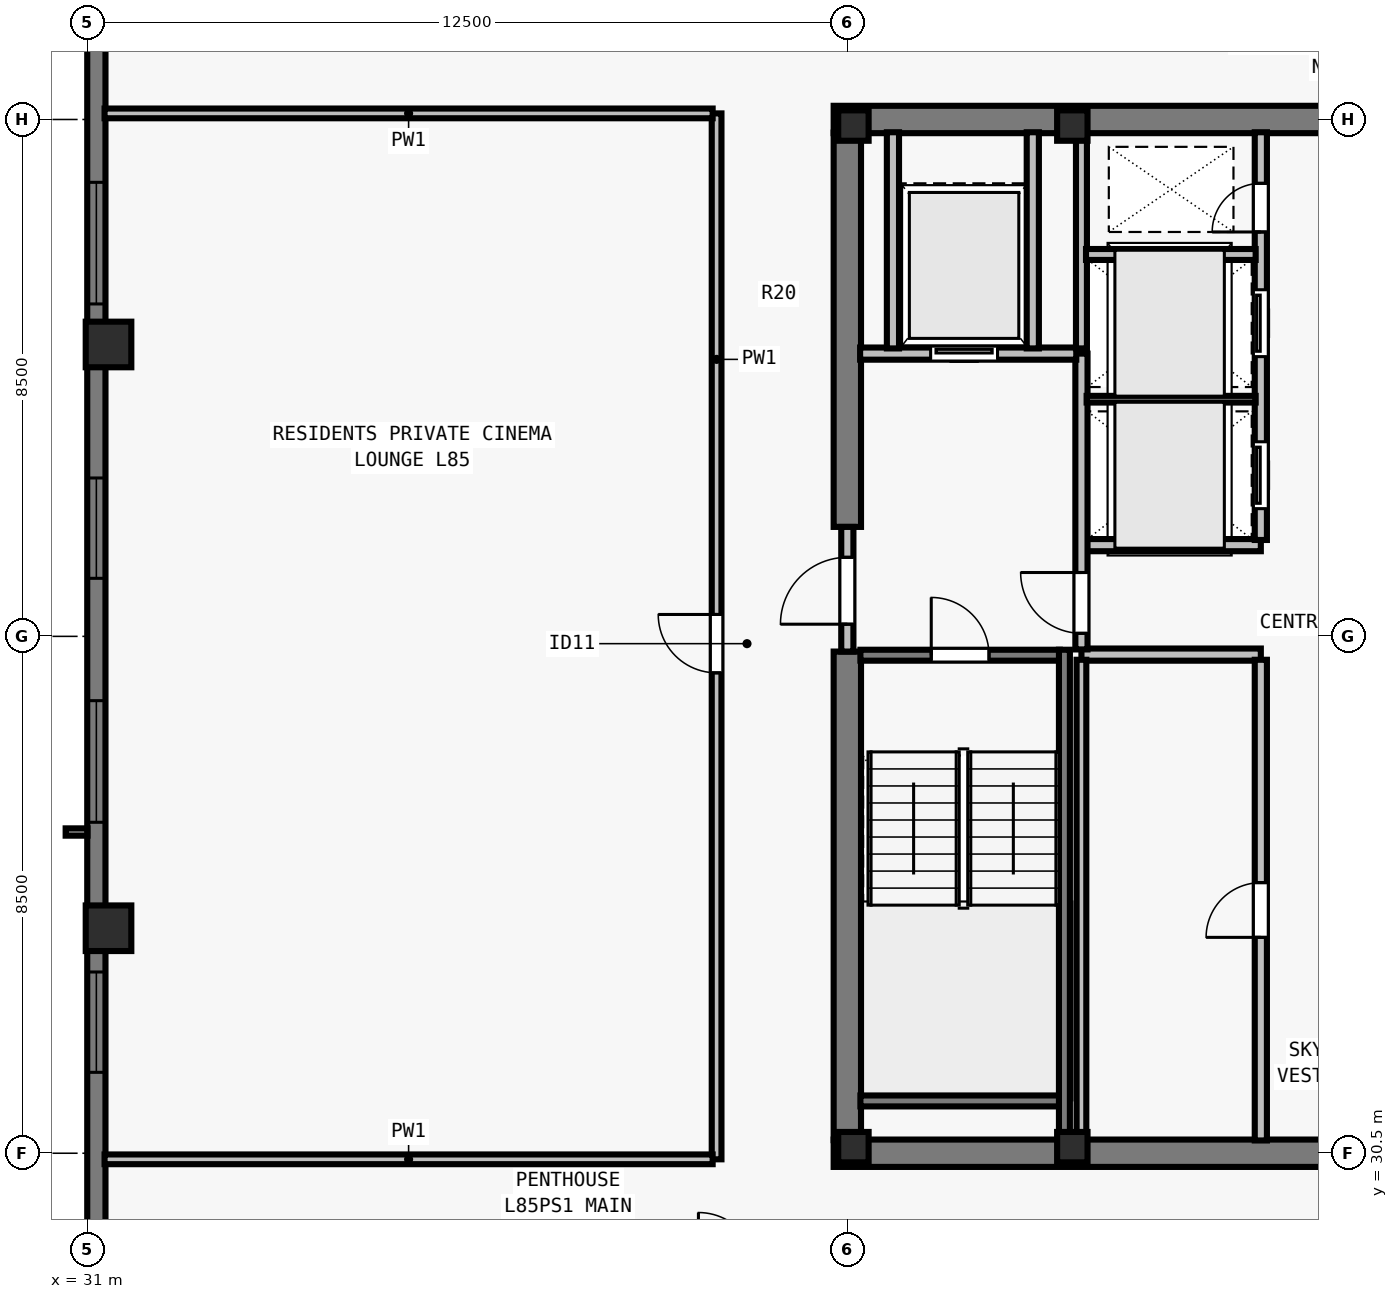
"""IFC4 building model, lengths in metres.
Left out: names, types, materials, properties, quantities, classifications, styles, units other than length and angle.
Written with IfcOpenShell. Run it as: python <this file> out.ifc"""

import sys

from ifc_helpers import new_model, si_unit, direction, frame, frame_2d, origin, origin_2d, place, context, subcontext, project, spatial, rectangle, i_section, extrude, element, fill, save


model = new_model("IFC4")
c1 = context("Model", 3, precision=1e-05, world=origin(), true_north=direction((0.0, 1.0)))
c2 = subcontext(c1, "Body", "Model", "MODEL_VIEW")
j1 = project(units=[si_unit("LENGTHUNIT", "METRE"), si_unit("PLANEANGLEUNIT", "RADIAN")], contexts=[c1])
p1 = place(None, origin())
s1 = spatial("IfcSite", under=j1, at=p1, CompositionType="ELEMENT")
p2 = place(p1, origin())
s2 = spatial("IfcBuilding", under=s1, at=p2, CompositionType="ELEMENT")
p3 = place(p2, frame((0.0, 0.0, 308.5)))
s3 = spatial("IfcBuildingStorey", under=s2, at=p3, CompositionType="ELEMENT", Elevation=308.5)
for number, where, z_axis, x_axis in (
    (1, (43.6, 30.6, 0.0), (0.0, 0.0, 1.0), (1.0, 0.0, 0.0)),
    (2, (47.2, 30.6, 0.0), (0.0, 0.0, 1.0), (1.0, 0.0, 0.0)),
    (3, (43.6, 47.4, 0.0), (0.0, 0.0, 1.0), (1.0, 0.0, 0.0)),
    (4, (47.2, 47.4, 0.0), (0.0, 0.0, 1.0), (1.0, 0.0, 0.0)),
):
    element("IfcColumn", number, at=place(p3, frame(where, z_axis=z_axis, x_axis=x_axis)), inside=s3, PredefinedType="COLUMN", context=c2, shape_type="SweptSolid", body=[
        extrude(i_section(OverallWidth=0.5, OverallDepth=0.5, WebThickness=0.028, FlangeThickness=0.045, at=origin_2d()), origin(), (0.0, 0.0, 1.0), 3.5),
    ])
for number, where, z_axis, x_axis in (
    (5, (31.35, 43.8, 0.0), (0.0, 0.0, 1.0), (0.0, 1.0, 0.0)),
    (6, (31.35, 34.2, 0.0), (0.0, 0.0, 1.0), (0.0, 1.0, 0.0)),
):
    element("IfcColumn", number, at=place(p3, frame(where, z_axis=z_axis, x_axis=x_axis)), inside=s3, PredefinedType="COLUMN", context=c2, shape_type="SweptSolid", body=[
        extrude(rectangle(XDim=0.75, YDim=0.75, at=origin_2d()), origin(), (0.0, 0.0, 1.0), 3.5),
    ])
p4 = place(p3, frame((31.15, 23.5, 0.0), z_axis=(0.0, 0.0, 1.0), x_axis=(0.0, 1.0, 0.0)))
e7 = element("IfcWall", 7, at=p4, inside=s3, PredefinedType="SOLIDWALL", context=c2, shape_type="SweptSolid", body=[
    extrude(rectangle(XDim=30.722, YDim=0.3, at=frame_2d((15.361, 0.0))), origin(), (0.0, 0.0, 1.0), 3.29),
])
p5 = place(p4, frame((8.331, 0.0, 0.8)))
e8 = element("IfcOpeningElement", 8, at=p5, cuts=e7, PredefinedType="OPENING", context=c2, shape_type="SweptSolid", body=[
    extrude(rectangle(XDim=1.65, YDim=1.758, at=frame_2d((0.825, 0.879))), frame((0.0, 0.16, 0.0), z_axis=(0.0, -1.0, 0.0), x_axis=(1.0, 0.0, 0.0)), (0.0, 0.0, 1.0), 0.32),
])
p6 = place(p4, frame((12.442, 0.0, 0.8)))
e9 = element("IfcOpeningElement", 9, at=p6, cuts=e7, PredefinedType="OPENING", context=c2, shape_type="SweptSolid", body=[
    extrude(rectangle(XDim=2.0, YDim=1.758, at=frame_2d((1.0, 0.879))), frame((0.0, 0.16, 0.0), z_axis=(0.0, -1.0, 0.0), x_axis=(1.0, 0.0, 0.0)), (0.0, 0.0, 1.0), 0.32),
])
p7 = place(p4, frame((16.455, 0.0, 0.8)))
e10 = element("IfcOpeningElement", 10, at=p7, cuts=e7, PredefinedType="OPENING", context=c2, shape_type="SweptSolid", body=[
    extrude(rectangle(XDim=1.65, YDim=1.758, at=frame_2d((0.825, 0.879))), frame((0.0, 0.16, 0.0), z_axis=(0.0, -1.0, 0.0), x_axis=(1.0, 0.0, 0.0)), (0.0, 0.0, 1.0), 0.32),
])
p8 = place(p4, frame((20.967, 0.0, 0.8)))
e11 = element("IfcOpeningElement", 11, at=p8, cuts=e7, PredefinedType="OPENING", context=c2, shape_type="SweptSolid", body=[
    extrude(rectangle(XDim=2.0, YDim=1.758, at=frame_2d((1.0, 0.879))), frame((0.0, 0.16, 0.0), z_axis=(0.0, -1.0, 0.0), x_axis=(1.0, 0.0, 0.0)), (0.0, 0.0, 1.0), 0.32),
])
for number, where, z_axis, x_axis in (
    (12, (43.275, 30.5, 0.0), (0.0, 0.0, 1.0), (1.0, 0.0, 0.0)),
    (13, (43.275, 47.5, 0.0), (0.0, 0.0, 1.0), (1.0, 0.0, 0.0)),
):
    element("IfcWall", number, at=place(p3, frame(where, z_axis=z_axis, x_axis=x_axis)), inside=s3, PredefinedType="SHEAR", context=c2, shape_type="SweptSolid", body=[
        extrude(rectangle(XDim=17.45, YDim=0.45, at=frame_2d((8.725, 0.0))), origin(), (0.0, 0.0, 1.0), 3.29),
    ])
p9 = place(p3, frame((43.5, 30.715, 0.0), z_axis=(0.0, 0.0, 1.0), x_axis=(0.0, 1.0, 0.0)))
e14 = element("IfcWall", 14, at=p9, inside=s3, PredefinedType="SHEAR", context=c2, shape_type="SweptSolid", body=[
    extrude(rectangle(XDim=8.035, YDim=0.45, at=frame_2d((4.018, 0.0))), origin(), (0.0, 0.0, 1.0), 3.29),
])
p10 = place(p3, frame((43.5, 40.8, 0.0), z_axis=(0.0, 0.0, 1.0), x_axis=(0.0, 1.0, 0.0)))
e15 = element("IfcWall", 15, at=p10, inside=s3, PredefinedType="SHEAR", context=c2, shape_type="SweptSolid", body=[
    extrude(rectangle(XDim=6.485, YDim=0.45, at=frame_2d((3.242, 0.0))), origin(), (0.0, 0.0, 1.0), 3.29),
])
for number, where, z_axis, x_axis in (
    (16, (47.35, 38.7, 0.0), (0.0, 0.0, 1.0), (1.0, 0.0, 0.0)),
    (17, (47.35, 40.5, 0.0), (0.0, 0.0, 1.0), (1.0, 0.0, 0.0)),
):
    element("IfcWall", number, at=place(p3, frame(where, z_axis=z_axis, x_axis=x_axis)), inside=s3, PredefinedType="SOLIDWALL", context=c2, shape_type="SweptSolid", body=[
        extrude(rectangle(XDim=2.95, YDim=0.2, at=frame_2d((1.475, 0.0))), origin(), (0.0, 0.0, 1.0), 3.29),
    ])
p11 = place(p3, frame((50.3, 30.71, 0.0), z_axis=(0.0, 0.0, 1.0), x_axis=(0.0, 1.0, 0.0)))
e18 = element("IfcWall", 18, at=p11, inside=s3, PredefinedType="SOLIDWALL", context=c2, shape_type="SweptSolid", body=[
    extrude(rectangle(XDim=7.905, YDim=0.2, at=frame_2d((3.953, 0.0))), origin(), (0.0, 0.0, 1.0), 3.29),
])
p12 = place(p11, frame((3.34, 0.0, 0.0)))
e19 = element("IfcOpeningElement", 19, at=p12, cuts=e18, PredefinedType="OPENING", context=c2, shape_type="SweptSolid", body=[
    extrude(rectangle(XDim=0.9, YDim=2.12, at=frame_2d((0.45, 1.06))), frame((0.0, 0.11, 0.0), z_axis=(0.0, -1.0, 0.0), x_axis=(1.0, 0.0, 0.0)), (0.0, 0.0, 1.0), 0.22),
])
p13 = place(p3, frame((50.3, 40.585, 0.0), z_axis=(0.0, 0.0, 1.0), x_axis=(0.0, 1.0, 0.0)))
e20 = element("IfcWall", 20, at=p13, inside=s3, PredefinedType="SOLIDWALL", context=c2, shape_type="SweptSolid", body=[
    extrude(rectangle(XDim=6.705, YDim=0.2, at=frame_2d((3.353, 0.0))), origin(), (0.0, 0.0, 1.0), 3.29),
])
p14 = place(p13, frame((0.515, 0.0, 0.0)))
e21 = element("IfcOpeningElement", 21, at=p14, cuts=e20, PredefinedType="OPENING", context=c2, shape_type="SweptSolid", body=[
    extrude(rectangle(XDim=1.1, YDim=2.2, at=frame_2d((0.55, 1.1))), frame((0.0, 0.11, 0.0), z_axis=(0.0, -1.0, 0.0), x_axis=(1.0, 0.0, 0.0)), (0.0, 0.0, 1.0), 0.22),
])
p15 = place(p13, frame((3.015, 0.0, 0.0)))
e22 = element("IfcOpeningElement", 22, at=p15, cuts=e20, PredefinedType="OPENING", context=c2, shape_type="SweptSolid", body=[
    extrude(rectangle(XDim=1.1, YDim=2.2, at=frame_2d((0.55, 1.1))), frame((0.0, 0.11, 0.0), z_axis=(0.0, -1.0, 0.0), x_axis=(1.0, 0.0, 0.0)), (0.0, 0.0, 1.0), 0.22),
])
p16 = place(p13, frame((5.065, 0.0, 0.0)))
e23 = element("IfcOpeningElement", 23, at=p16, cuts=e20, PredefinedType="OPENING", context=c2, shape_type="SweptSolid", body=[
    extrude(rectangle(XDim=0.8, YDim=2.08, at=frame_2d((0.4, 1.04))), frame((0.0, 0.11, 0.0), z_axis=(0.0, -1.0, 0.0), x_axis=(1.0, 0.0, 0.0)), (0.0, 0.0, 1.0), 0.22),
])
p17 = place(p3, frame((43.5, 38.75, 0.0), z_axis=(0.0, 0.0, 1.0), x_axis=(0.0, 1.0, 0.0)))
e24 = element("IfcWall", 24, at=p17, inside=s3, PredefinedType="SOLIDWALL", context=c2, shape_type="SweptSolid", body=[
    extrude(rectangle(XDim=2.05, YDim=0.2, at=frame_2d((1.025, 0.0))), origin(), (0.0, 0.0, 1.0), 3.29),
])
p18 = place(p17, frame((0.45, 0.0, 0.0)))
e25 = element("IfcOpeningElement", 25, at=p18, cuts=e24, PredefinedType="OPENING", context=c2, shape_type="SweptSolid", body=[
    extrude(rectangle(XDim=1.1, YDim=2.15, at=frame_2d((0.55, 1.075))), frame((0.0, 0.11, 0.0), z_axis=(0.0, -1.0, 0.0), x_axis=(1.0, 0.0, 0.0)), (0.0, 0.0, 1.0), 0.22),
])
p19 = place(p3, frame((47.35, 38.785, 0.0), z_axis=(0.0, 0.0, 1.0), x_axis=(0.0, 1.0, 0.0)))
e26 = element("IfcWall", 26, at=p19, inside=s3, PredefinedType="SOLIDWALL", context=c2, shape_type="SweptSolid", body=[
    extrude(rectangle(XDim=4.865, YDim=0.2, at=frame_2d((2.433, 0.0))), origin(), (0.0, 0.0, 1.0), 3.29),
])
p20 = place(p19, frame((0.265, 0.0, 0.0)))
e27 = element("IfcOpeningElement", 27, at=p20, cuts=e26, PredefinedType="OPENING", context=c2, shape_type="SweptSolid", body=[
    extrude(rectangle(XDim=1.0, YDim=2.15, at=frame_2d((0.5, 1.075))), frame((0.0, 0.11, 0.0), z_axis=(0.0, -1.0, 0.0), x_axis=(1.0, 0.0, 0.0)), (0.0, 0.0, 1.0), 0.22),
])
p21 = place(p3, frame((43.71, 43.65, 0.0), z_axis=(0.0, 0.0, 1.0), x_axis=(1.0, 0.0, 0.0)))
e28 = element("IfcWall", 28, at=p21, inside=s3, PredefinedType="SOLIDWALL", context=c2, shape_type="SweptSolid", body=[
    extrude(rectangle(XDim=3.555, YDim=0.2, at=frame_2d((1.777, 0.0))), origin(), (0.0, 0.0, 1.0), 3.29),
])
p22 = place(p21, frame((1.16, 0.0, 0.0)))
e29 = element("IfcOpeningElement", 29, at=p22, cuts=e28, PredefinedType="OPENING", context=c2, shape_type="SweptSolid", body=[
    extrude(rectangle(XDim=1.1, YDim=2.2, at=frame_2d((0.55, 1.1))), frame((0.0, 0.11, 0.0), z_axis=(0.0, -1.0, 0.0), x_axis=(1.0, 0.0, 0.0)), (0.0, 0.0, 1.0), 0.22),
])
for number, where, z_axis, x_axis in (
    (30, (46.55, 43.735, 0.0), (0.0, 0.0, 1.0), (0.0, 1.0, 0.0)),
    (31, (44.25, 43.735, 0.0), (0.0, 0.0, 1.0), (0.0, 1.0, 0.0)),
):
    element("IfcWall", number, at=place(p3, frame(where, z_axis=z_axis, x_axis=x_axis)), inside=s3, PredefinedType="SOLIDWALL", context=c2, shape_type="SweptSolid", body=[
        extrude(rectangle(XDim=3.555, YDim=0.2, at=frame_2d((1.777, 0.0))), origin(), (0.0, 0.0, 1.0), 3.29),
    ])
p23 = place(p3, frame((47.35, 30.71, 0.0), z_axis=(0.0, 0.0, 1.0), x_axis=(0.0, 1.0, 0.0)))
e32 = element("IfcWall", 32, at=p23, inside=s3, PredefinedType="PARTITIONING", context=c2, shape_type="SweptSolid", body=[
    extrude(rectangle(XDim=7.905, YDim=0.16, at=frame_2d((3.953, 0.0))), origin(), (0.0, 0.0, 1.0), 3.29),
])
p24 = place(p3, frame((47.35, 43.735, 0.0), z_axis=(0.0, 0.0, 1.0), x_axis=(0.0, 1.0, 0.0)))
e33 = element("IfcWall", 33, at=p24, inside=s3, PredefinedType="SOLIDWALL", context=c2, shape_type="SweptSolid", body=[
    extrude(rectangle(XDim=3.555, YDim=0.18, at=frame_2d((1.777, 0.0))), origin(), (0.0, 0.0, 1.0), 3.29),
])
p25 = place(p3, frame((47.435, 42.9, 0.0), z_axis=(0.0, 0.0, 1.0), x_axis=(1.0, 0.0, 0.0)))
e34 = element("IfcWall", 34, at=p25, inside=s3, PredefinedType="PARTITIONING", context=c2, shape_type="SweptSolid", body=[
    extrude(rectangle(XDim=2.78, YDim=0.11, at=frame_2d((1.39, 0.0))), origin(), (0.0, 0.0, 1.0), 3.29),
])
p26 = place(p3, frame((47.425, 45.28, 0.0), z_axis=(0.0, 0.0, 1.0), x_axis=(1.0, 0.0, 0.0)))
e35 = element("IfcWall", 35, at=p26, inside=s3, PredefinedType="SOLIDWALL", context=c2, shape_type="SweptSolid", body=[
    extrude(rectangle(XDim=2.79, YDim=0.18, at=frame_2d((1.395, 0.0))), origin(), (0.0, 0.0, 1.0), 3.29),
])
p27 = place(p3, frame((41.35, 30.4, 0.0), z_axis=(0.0, 0.0, 1.0), x_axis=(0.0, 1.0, 0.0)))
e36 = element("IfcWall", 36, at=p27, inside=s3, PredefinedType="PARTITIONING", context=c2, shape_type="SweptSolid", body=[
    extrude(rectangle(XDim=17.2, YDim=0.16, at=frame_2d((8.6, 0.0))), origin(), (0.0, 0.0, 1.0), 3.009),
])
p28 = place(p27, frame((8.0, 0.0, 0.0)))
e37 = element("IfcOpeningElement", 37, at=p28, cuts=e36, PredefinedType="OPENING", context=c2, shape_type="SweptSolid", body=[
    extrude(rectangle(XDim=0.96, YDim=2.12, at=frame_2d((0.48, 1.06))), frame((0.0, 0.09, 0.0), z_axis=(0.0, -1.0, 0.0), x_axis=(1.0, 0.0, 0.0)), (0.0, 0.0, 1.0), 0.18),
])
for number, where, z_axis, x_axis in (
    (38, (31.285, 30.4, 0.0), (0.0, 0.0, 1.0), (1.0, 0.0, 0.0)),
    (39, (31.285, 47.6, 0.0), (0.0, 0.0, 1.0), (1.0, 0.0, 0.0)),
):
    element("IfcWall", number, at=place(p3, frame(where, z_axis=z_axis, x_axis=x_axis)), inside=s3, PredefinedType="PARTITIONING", context=c2, shape_type="SweptSolid", body=[
        extrude(rectangle(XDim=10.0, YDim=0.16, at=frame_2d((5.0, 0.0))), origin(), (0.0, 0.0, 1.0), 3.29),
    ])
p29 = place(p3, frame((43.715, 38.69, 0.0), z_axis=(0.0, 0.0, 1.0), x_axis=(1.0, 0.0, 0.0)))
e40 = element("IfcWall", 40, at=p29, inside=s3, PredefinedType="SOLIDWALL", context=c2, shape_type="SweptSolid", body=[
    extrude(rectangle(XDim=3.28, YDim=0.18, at=frame_2d((1.64, 0.0))), origin(), (0.0, 0.0, 1.0), 3.29),
])
p30 = place(p29, frame((1.165, 0.0, 0.0)))
e41 = element("IfcOpeningElement", 41, at=p30, cuts=e40, PredefinedType="OPENING", context=c2, shape_type="SweptSolid", body=[
    extrude(rectangle(XDim=0.95, YDim=2.15, at=frame_2d((0.475, 1.075))), frame((0.0, 0.1, 0.0), z_axis=(0.0, -1.0, 0.0), x_axis=(1.0, 0.0, 0.0)), (0.0, 0.0, 1.0), 0.2),
])
p31 = place(p3, frame((43.715, 31.36, 0.0), z_axis=(0.0, 0.0, 1.0), x_axis=(1.0, 0.0, 0.0)))
e42 = element("IfcWall", 42, at=p31, inside=s3, PredefinedType="SOLIDWALL", context=c2, shape_type="SweptSolid", body=[
    extrude(rectangle(XDim=3.28, YDim=0.18, at=frame_2d((1.64, 0.0))), origin(), (0.0, 0.0, 1.0), 3.29),
])
p32 = place(p3, frame((47.07, 38.78, 0.0), z_axis=(0.0, 0.0, 1.0), x_axis=(0.0, -1.0, 0.0)))
e43 = element("IfcWall", 43, at=p32, inside=s3, PredefinedType="SOLIDWALL", context=c2, shape_type="SweptSolid", body=[
    extrude(rectangle(XDim=8.067, YDim=0.18, at=frame_2d((4.034, 0.0))), origin(), (0.0, 0.0, 1.0), 3.29),
])
p33 = place(p5, origin())
e44 = element("IfcWindow", 44, at=p33, inside=s3, PartitioningType="SINGLE_PANEL", PredefinedType="WINDOW", context=c2, shape_type="SweptSolid", body=[
    extrude(rectangle(XDim=1.65, YDim=1.758, at=frame_2d((0.825, 0.879))), frame((0.0, -0.05, 0.0), z_axis=(0.0, -1.0, 0.0), x_axis=(1.0, 0.0, 0.0)), (0.0, 0.0, 1.0), 0.06),
])
fill(e8, e44)
p34 = place(p6, origin())
e45 = element("IfcWindow", 45, at=p34, inside=s3, PartitioningType="SINGLE_PANEL", PredefinedType="WINDOW", context=c2, shape_type="SweptSolid", body=[
    extrude(rectangle(XDim=2.0, YDim=1.758, at=frame_2d((1.0, 0.879))), frame((0.0, -0.05, 0.0), z_axis=(0.0, -1.0, 0.0), x_axis=(1.0, 0.0, 0.0)), (0.0, 0.0, 1.0), 0.06),
])
fill(e9, e45)
p35 = place(p7, origin())
e46 = element("IfcWindow", 46, at=p35, inside=s3, PartitioningType="SINGLE_PANEL", PredefinedType="WINDOW", context=c2, shape_type="SweptSolid", body=[
    extrude(rectangle(XDim=1.65, YDim=1.758, at=frame_2d((0.825, 0.879))), frame((0.0, -0.05, 0.0), z_axis=(0.0, -1.0, 0.0), x_axis=(1.0, 0.0, 0.0)), (0.0, 0.0, 1.0), 0.06),
])
fill(e10, e46)
p36 = place(p8, origin())
e47 = element("IfcWindow", 47, at=p36, inside=s3, PartitioningType="SINGLE_PANEL", PredefinedType="WINDOW", context=c2, shape_type="SweptSolid", body=[
    extrude(rectangle(XDim=2.0, YDim=1.758, at=frame_2d((1.0, 0.879))), frame((0.0, -0.05, 0.0), z_axis=(0.0, -1.0, 0.0), x_axis=(1.0, 0.0, 0.0)), (0.0, 0.0, 1.0), 0.06),
])
fill(e11, e47)
p37 = place(p18, origin())
e48 = element("IfcDoor", 48, at=p37, inside=s3, OperationType="SINGLE_SWING_LEFT", PredefinedType="DOOR", context=c2, shape_type="SweptSolid", body=[
    extrude(rectangle(XDim=1.1, YDim=2.15, at=frame_2d((0.55, 1.075))), frame((0.0, 0.025, 0.0), z_axis=(0.0, -1.0, 0.0), x_axis=(1.0, 0.0, 0.0)), (0.0, 0.0, 1.0), 0.05),
])
fill(e25, e48)
p38 = place(p20, origin())
e49 = element("IfcDoor", 49, at=p38, inside=s3, OperationType="SINGLE_SWING_RIGHT", PredefinedType="DOOR", context=c2, shape_type="SweptSolid", body=[
    extrude(rectangle(XDim=1.0, YDim=2.15, at=frame_2d((0.5, 1.075))), frame((0.0, 0.025, 0.0), z_axis=(0.0, -1.0, 0.0), x_axis=(1.0, 0.0, 0.0)), (0.0, 0.0, 1.0), 0.05),
])
fill(e27, e49)
p39 = place(p22, origin())
e50 = element("IfcDoor", 50, at=p39, inside=s3, OperationType="SLIDING_TO_LEFT", PredefinedType="DOOR", context=c2, shape_type="SweptSolid", body=[
    extrude(rectangle(XDim=1.1, YDim=2.2, at=frame_2d((0.55, 1.1))), frame((0.0, 0.025, 0.0), z_axis=(0.0, -1.0, 0.0), x_axis=(1.0, 0.0, 0.0)), (0.0, 0.0, 1.0), 0.05),
])
fill(e29, e50)
p40 = place(p12, origin())
e51 = element("IfcDoor", 51, at=p40, inside=s3, OperationType="SINGLE_SWING_LEFT", PredefinedType="DOOR", context=c2, shape_type="SweptSolid", body=[
    extrude(rectangle(XDim=0.9, YDim=2.12, at=frame_2d((0.45, 1.06))), frame((0.0, 0.025, 0.0), z_axis=(0.0, -1.0, 0.0), x_axis=(1.0, 0.0, 0.0)), (0.0, 0.0, 1.0), 0.05),
])
fill(e19, e51)
p41 = place(p14, origin())
e52 = element("IfcDoor", 52, at=p41, inside=s3, OperationType="SLIDING_TO_LEFT", PredefinedType="DOOR", context=c2, shape_type="SweptSolid", body=[
    extrude(rectangle(XDim=1.1, YDim=2.2, at=frame_2d((0.55, 1.1))), frame((0.0, 0.025, 0.0), z_axis=(0.0, -1.0, 0.0), x_axis=(1.0, 0.0, 0.0)), (0.0, 0.0, 1.0), 0.05),
])
fill(e21, e52)
p42 = place(p15, origin())
e53 = element("IfcDoor", 53, at=p42, inside=s3, OperationType="SLIDING_TO_LEFT", PredefinedType="DOOR", context=c2, shape_type="SweptSolid", body=[
    extrude(rectangle(XDim=1.1, YDim=2.2, at=frame_2d((0.55, 1.1))), frame((0.0, 0.025, 0.0), z_axis=(0.0, -1.0, 0.0), x_axis=(1.0, 0.0, 0.0)), (0.0, 0.0, 1.0), 0.05),
])
fill(e22, e53)
p43 = place(p16, origin())
e54 = element("IfcDoor", 54, at=p43, inside=s3, OperationType="SINGLE_SWING_LEFT", PredefinedType="DOOR", context=c2, shape_type="SweptSolid", body=[
    extrude(rectangle(XDim=0.8, YDim=2.08, at=frame_2d((0.4, 1.04))), frame((0.0, 0.025, 0.0), z_axis=(0.0, -1.0, 0.0), x_axis=(1.0, 0.0, 0.0)), (0.0, 0.0, 1.0), 0.05),
])
fill(e23, e54)
p44 = place(p28, origin())
e55 = element("IfcDoor", 55, at=p44, inside=s3, OperationType="SINGLE_SWING_RIGHT", PredefinedType="DOOR", context=c2, shape_type="SweptSolid", body=[
    extrude(rectangle(XDim=0.96, YDim=2.12, at=frame_2d((0.48, 1.06))), frame((0.0, 0.025, 0.0), z_axis=(0.0, -1.0, 0.0), x_axis=(1.0, 0.0, 0.0)), (0.0, 0.0, 1.0), 0.05),
])
fill(e37, e55)
p45 = place(p30, origin())
e56 = element("IfcDoor", 56, at=p45, inside=s3, OperationType="SINGLE_SWING_LEFT", PredefinedType="DOOR", context=c2, shape_type="SweptSolid", body=[
    extrude(rectangle(XDim=0.95, YDim=2.15, at=frame_2d((0.475, 1.075))), frame((0.0, 0.025, 0.0), z_axis=(0.0, -1.0, 0.0), x_axis=(1.0, 0.0, 0.0)), (0.0, 0.0, 1.0), 0.05),
])
fill(e41, e56)
save(model, sys.argv[1])
